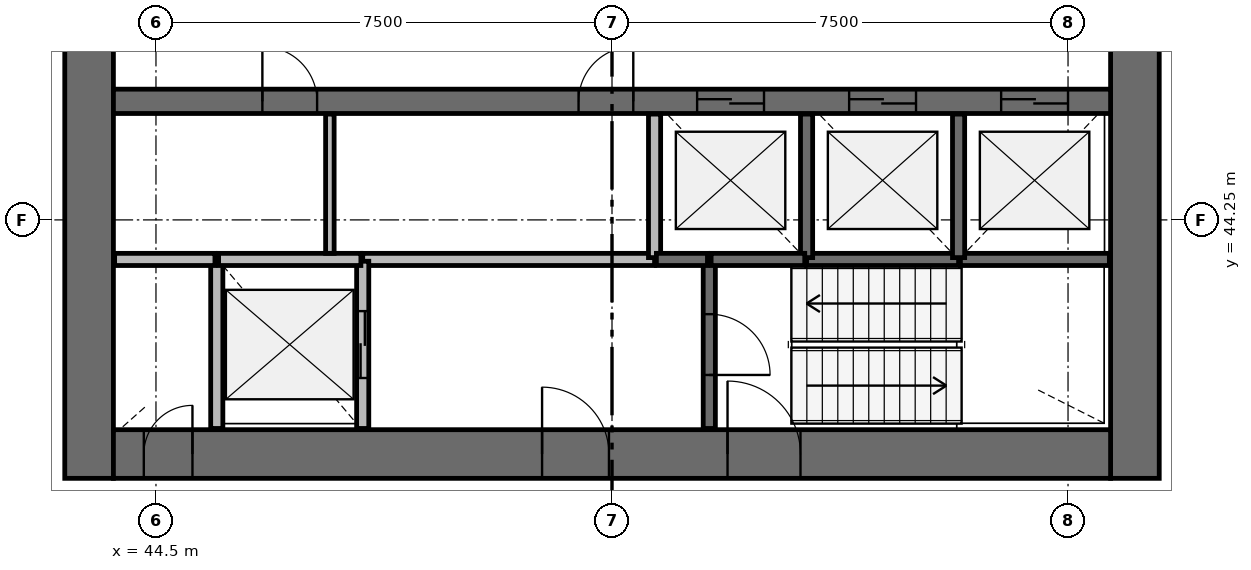
"""IFC4 building model, lengths in metres.
Left out: names, types, materials, properties, quantities, classifications, styles, units other than length and angle.
Written with IfcOpenShell. Run it as: python <this file> out.ifc"""

import sys

from ifc_helpers import new_model, si_unit, direction, frame, frame_2d, origin, place, context, subcontext, project, spatial, rectangle, extrude, source, transform, mapped, element, fill, save


model = new_model("IFC4")
c1 = context("Model", 3, precision=1e-05, world=origin(), true_north=direction((0.0, 1.0)))
c2 = subcontext(c1, "Body", "Model", "MODEL_VIEW")
j1 = project(units=[si_unit("LENGTHUNIT", "METRE"), si_unit("PLANEANGLEUNIT", "RADIAN")], contexts=[c1])
p1 = place(None, origin())
s1 = spatial("IfcSite", under=j1, at=p1, CompositionType="ELEMENT")
p2 = place(p1, origin())
s2 = spatial("IfcBuilding", under=s1, at=p2, CompositionType="ELEMENT")
p3 = place(p2, frame((0.0, 0.0, 160.4)))
s3 = spatial("IfcBuildingStorey", under=s2, at=p3, CompositionType="ELEMENT", Elevation=160.4)
p4 = place(p3, frame((60.6, 40.0, 0.0), z_axis=(0.0, 0.0, 1.0), x_axis=(0.0, 1.0, 0.0)))
e1 = element("IfcWall", 1, at=p4, inside=s3, PredefinedType="SHEAR", context=c2, shape_type="SweptSolid", body=[
    extrude(rectangle(XDim=16.0, YDim=0.8, at=frame_2d((8.0, 0.0))), origin(), (0.0, 0.0, 1.0), 3.9),
])
p5 = place(p4, frame((7.1, 0.0, 0.0)))
e2 = element("IfcOpeningElement", 2, at=p5, cuts=e1, PredefinedType="OPENING", context=c2, shape_type="SweptSolid", body=[
    extrude(rectangle(XDim=1.8, YDim=2.1, at=frame_2d((0.9, 1.05))), frame((0.0, 0.41, 0.0), z_axis=(0.0, -1.0, 0.0), x_axis=(1.0, 0.0, 0.0)), (0.0, 0.0, 1.0), 0.82),
])
p6 = place(p3, frame((43.4, 56.0, 0.0), z_axis=(0.0, 0.0, 1.0), x_axis=(0.0, -1.0, 0.0)))
e3 = element("IfcWall", 3, at=p6, inside=s3, PredefinedType="SHEAR", context=c2, shape_type="SweptSolid", body=[
    extrude(rectangle(XDim=16.0, YDim=0.8, at=frame_2d((8.0, 0.0))), origin(), (0.0, 0.0, 1.0), 3.9),
])
p7 = place(p6, frame((7.1, 0.0, 0.0)))
e4 = element("IfcOpeningElement", 4, at=p7, cuts=e3, PredefinedType="OPENING", context=c2, shape_type="SweptSolid", body=[
    extrude(rectangle(XDim=1.8, YDim=2.1, at=frame_2d((0.9, 1.05))), frame((0.0, 0.41, 0.0), z_axis=(0.0, -1.0, 0.0), x_axis=(1.0, 0.0, 0.0)), (0.0, 0.0, 1.0), 0.82),
])
p8 = place(p3, frame((43.8, 40.4, 0.0), z_axis=(0.0, 0.0, 1.0), x_axis=(1.0, 0.0, 0.0)))
e5 = element("IfcWall", 5, at=p8, inside=s3, PredefinedType="SHEAR", context=c2, shape_type="SweptSolid", body=[
    extrude(rectangle(XDim=16.4, YDim=0.8, at=frame_2d((8.2, 0.0))), origin(), (0.0, 0.0, 1.0), 3.9),
])
p9 = place(p8, frame((10.1, 0.0, 0.0)))
e6 = element("IfcOpeningElement", 6, at=p9, cuts=e5, PredefinedType="OPENING", context=c2, shape_type="SweptSolid", body=[
    extrude(rectangle(XDim=1.2, YDim=2.1, at=frame_2d((0.6, 1.05))), frame((0.0, 0.41, 0.0), z_axis=(0.0, -1.0, 0.0), x_axis=(1.0, 0.0, 0.0)), (0.0, 0.0, 1.0), 0.82),
])
p10 = place(p8, frame((7.05, 0.0, 0.0)))
e7 = element("IfcOpeningElement", 7, at=p10, cuts=e5, PredefinedType="OPENING", context=c2, shape_type="SweptSolid", body=[
    extrude(rectangle(XDim=1.1, YDim=2.1, at=frame_2d((0.55, 1.05))), frame((0.0, 0.41, 0.0), z_axis=(0.0, -1.0, 0.0), x_axis=(1.0, 0.0, 0.0)), (0.0, 0.0, 1.0), 0.82),
])
p11 = place(p8, frame((0.5, 0.0, 0.0)))
e8 = element("IfcOpeningElement", 8, at=p11, cuts=e5, PredefinedType="OPENING", context=c2, shape_type="SweptSolid", body=[
    extrude(rectangle(XDim=0.8, YDim=2.1, at=frame_2d((0.4, 1.05))), frame((0.0, 0.41, 0.0), z_axis=(0.0, -1.0, 0.0), x_axis=(1.0, 0.0, 0.0)), (0.0, 0.0, 1.0), 0.82),
])
p12 = place(p3, frame((43.8, 46.2, 0.0), z_axis=(0.0, 0.0, 1.0), x_axis=(1.0, 0.0, 0.0)))
e9 = element("IfcWall", 9, at=p12, inside=s3, PredefinedType="SHEAR", context=c2, shape_type="SweptSolid", body=[
    extrude(rectangle(XDim=16.4, YDim=0.4, at=frame_2d((8.2, 0.0))), origin(), (0.0, 0.0, 1.0), 3.9),
])
p13 = place(p12, frame((9.6, 0.0, 0.0)))
e10 = element("IfcOpeningElement", 10, at=p13, cuts=e9, PredefinedType="OPENING", context=c2, shape_type="SweptSolid", body=[
    extrude(rectangle(XDim=1.1, YDim=2.1, at=frame_2d((0.55, 1.05))), frame((0.0, 0.21, 0.0), z_axis=(0.0, -1.0, 0.0), x_axis=(1.0, 0.0, 0.0)), (0.0, 0.0, 1.0), 0.42),
])
p14 = place(p12, frame((12.1, 0.0, 0.0)))
e11 = element("IfcOpeningElement", 11, at=p14, cuts=e9, PredefinedType="OPENING", context=c2, shape_type="SweptSolid", body=[
    extrude(rectangle(XDim=1.1, YDim=2.1, at=frame_2d((0.55, 1.05))), frame((0.0, 0.21, 0.0), z_axis=(0.0, -1.0, 0.0), x_axis=(1.0, 0.0, 0.0)), (0.0, 0.0, 1.0), 0.42),
])
p15 = place(p12, frame((14.6, 0.0, 0.0)))
e12 = element("IfcOpeningElement", 12, at=p15, cuts=e9, PredefinedType="OPENING", context=c2, shape_type="SweptSolid", body=[
    extrude(rectangle(XDim=1.1, YDim=2.1, at=frame_2d((0.55, 1.05))), frame((0.0, 0.21, 0.0), z_axis=(0.0, -1.0, 0.0), x_axis=(1.0, 0.0, 0.0)), (0.0, 0.0, 1.0), 0.42),
])
p16 = place(p12, frame((2.45, 0.0, 0.0)))
e13 = element("IfcOpeningElement", 13, at=p16, cuts=e9, PredefinedType="OPENING", context=c2, shape_type="SweptSolid", body=[
    extrude(rectangle(XDim=0.9, YDim=2.1, at=frame_2d((0.45, 1.05))), frame((0.0, 0.21, 0.0), z_axis=(0.0, -1.0, 0.0), x_axis=(1.0, 0.0, 0.0)), (0.0, 0.0, 1.0), 0.42),
])
p17 = place(p12, frame((7.65, 0.0, 0.0)))
e14 = element("IfcOpeningElement", 14, at=p17, cuts=e9, PredefinedType="OPENING", context=c2, shape_type="SweptSolid", body=[
    extrude(rectangle(XDim=0.9, YDim=2.1, at=frame_2d((0.45, 1.05))), frame((0.0, 0.21, 0.0), z_axis=(0.0, -1.0, 0.0), x_axis=(1.0, 0.0, 0.0)), (0.0, 0.0, 1.0), 0.42),
])
p18 = place(p3, frame((52.7, 43.6, 0.0), z_axis=(0.0, 0.0, 1.0), x_axis=(-1.0, 0.0, 0.0)))
e15 = element("IfcWall", 15, at=p18, inside=s3, PredefinedType="SOLIDWALL", context=c2, shape_type="SweptSolid", body=[
    extrude(rectangle(XDim=4.8, YDim=0.2, at=frame_2d((2.4, 0.0))), origin(), (0.0, 0.0, 1.0), 3.58),
])
p19 = place(p3, frame((45.5, 43.6, 0.0), z_axis=(0.0, 0.0, 1.0), x_axis=(0.0, -1.0, 0.0)))
e16 = element("IfcWall", 16, at=p19, inside=s3, PredefinedType="SOLIDWALL", context=c2, shape_type="SweptSolid", body=[
    extrude(rectangle(XDim=2.78, YDim=0.2, at=frame_2d((1.39, 0.0))), origin(), (0.0, 0.0, 1.0), 3.58),
])
p20 = place(p3, frame((47.9, 40.82, 0.0), z_axis=(0.0, 0.0, 1.0), x_axis=(0.0, 1.0, 0.0)))
e17 = element("IfcWall", 17, at=p20, inside=s3, PredefinedType="SOLIDWALL", context=c2, shape_type="SweptSolid", body=[
    extrude(rectangle(XDim=2.75, YDim=0.2, at=frame_2d((1.375, 0.0))), origin(), (0.0, 0.0, 1.0), 3.58),
])
p21 = place(p20, frame((0.83, 0.0, 0.0)))
e18 = element("IfcOpeningElement", 18, at=p21, cuts=e17, PredefinedType="OPENING", context=c2, shape_type="SweptSolid", body=[
    extrude(rectangle(XDim=1.1, YDim=2.1, at=frame_2d((0.55, 1.05))), frame((0.0, 0.11, 0.0), z_axis=(0.0, -1.0, 0.0), x_axis=(1.0, 0.0, 0.0)), (0.0, 0.0, 1.0), 0.22),
])
p22 = place(p3, frame((53.6, 43.6, 0.0), z_axis=(0.0, 0.0, 1.0), x_axis=(0.0, -1.0, 0.0)))
e19 = element("IfcWall", 19, at=p22, inside=s3, PredefinedType="SOLIDWALL", context=c2, shape_type="SweptSolid", body=[
    extrude(rectangle(XDim=2.78, YDim=0.2, at=frame_2d((1.39, 0.0))), origin(), (0.0, 0.0, 1.0), 3.58),
])
p23 = place(p22, frame((0.9, 0.0, 0.0)))
e20 = element("IfcOpeningElement", 20, at=p23, cuts=e19, PredefinedType="OPENING", context=c2, shape_type="SweptSolid", body=[
    extrude(rectangle(XDim=1.0, YDim=2.1, at=frame_2d((0.5, 1.05))), frame((0.0, 0.11, 0.0), z_axis=(0.0, -1.0, 0.0), x_axis=(1.0, 0.0, 0.0)), (0.0, 0.0, 1.0), 0.22),
])
p24 = place(p3, frame((55.2, 43.6, 0.0), z_axis=(0.0, 0.0, 1.0), x_axis=(1.0, 0.0, 0.0)))
e21 = element("IfcWall", 21, at=p24, inside=s3, PredefinedType="SOLIDWALL", context=c2, shape_type="SweptSolid", body=[
    extrude(rectangle(XDim=2.5, YDim=0.2, at=frame_2d((1.25, 0.0))), origin(), (0.0, 0.0, 1.0), 3.58),
])
p25 = place(p3, frame((57.73, 43.6, 0.0), z_axis=(0.0, 0.0, 1.0), x_axis=(1.0, 0.0, 0.0)))
e22 = element("IfcWall", 22, at=p25, inside=s3, PredefinedType="SOLIDWALL", context=c2, shape_type="SweptSolid", body=[
    extrude(rectangle(XDim=2.45, YDim=0.2, at=frame_2d((1.225, 0.0))), origin(), (0.0, 0.0, 1.0), 3.58),
])
p26 = place(p3, frame((47.87, 43.6, 0.0), z_axis=(0.0, 0.0, 1.0), x_axis=(-1.0, 0.0, 0.0)))
e23 = element("IfcWall", 23, at=p26, inside=s3, PredefinedType="SOLIDWALL", context=c2, shape_type="SweptSolid", body=[
    extrude(rectangle(XDim=2.34, YDim=0.2, at=frame_2d((1.17, 0.0))), origin(), (0.0, 0.0, 1.0), 3.58),
])
for number, where, z_axis, x_axis in (
    (24, (52.7, 45.99, 0.0), (0.0, 0.0, 1.0), (0.0, -1.0, 0.0)),
    (25, (55.2, 43.63, 0.0), (0.0, 0.0, 1.0), (0.0, 1.0, 0.0)),
    (26, (57.7, 43.63, 0.0), (0.0, 0.0, 1.0), (0.0, 1.0, 0.0)),
):
    element("IfcWall", number, at=place(p3, frame(where, z_axis=z_axis, x_axis=x_axis)), inside=s3, PredefinedType="SOLIDWALL", context=c2, shape_type="SweptSolid", body=[
        extrude(rectangle(XDim=2.36, YDim=0.2, at=frame_2d((1.18, 0.0))), origin(), (0.0, 0.0, 1.0), 3.58),
    ])
p27 = place(p3, frame((45.47, 43.6, 0.0), z_axis=(0.0, 0.0, 1.0), x_axis=(-1.0, 0.0, 0.0)))
e27 = element("IfcWall", 27, at=p27, inside=s3, PredefinedType="SOLIDWALL", context=c2, shape_type="SweptSolid", body=[
    extrude(rectangle(XDim=1.65, YDim=0.2, at=frame_2d((0.825, 0.0))), origin(), (0.0, 0.0, 1.0), 3.58),
])
p28 = place(p3, frame((53.63, 43.6, 0.0), z_axis=(0.0, 0.0, 1.0), x_axis=(1.0, 0.0, 0.0)))
e28 = element("IfcWall", 28, at=p28, inside=s3, PredefinedType="SOLIDWALL", context=c2, shape_type="SweptSolid", body=[
    extrude(rectangle(XDim=1.54, YDim=0.2, at=frame_2d((0.77, 0.0))), origin(), (0.0, 0.0, 1.0), 3.58),
])
p29 = place(p3, frame((52.73, 43.6, 0.0), z_axis=(0.0, 0.0, 1.0), x_axis=(1.0, 0.0, 0.0)))
e29 = element("IfcWall", 29, at=p29, inside=s3, PredefinedType="SOLIDWALL", context=c2, shape_type="SweptSolid", body=[
    extrude(rectangle(XDim=0.84, YDim=0.2, at=frame_2d((0.42, 0.0))), origin(), (0.0, 0.0, 1.0), 3.58),
])
p30 = place(p3, frame((47.36, 43.7, 0.0), z_axis=(0.0, 0.0, 1.0), x_axis=(0.0, 1.0, 0.0)))
e30 = element("IfcWall", 30, at=p30, inside=s3, PredefinedType="PARTITIONING", context=c2, shape_type="SweptSolid", body=[
    extrude(rectangle(XDim=2.29, YDim=0.14, at=frame_2d((1.145, 0.0))), origin(), (0.0, 0.0, 1.0), 2.88),
])
m1 = source(origin(), c2, "Body", "SweptSolid", [
    extrude(rectangle(XDim=1.1, YDim=2.1, at=frame_2d((0.55, 1.05))), frame((0.0, 0.025, 0.0), z_axis=(0.0, -1.0, 0.0), x_axis=(1.0, 0.0, 0.0)), (0.0, 0.0, 1.0), 0.05),
])
p31 = place(p13, origin())
e31 = element("IfcDoor", 31, at=p31, inside=s3, OperationType="DOUBLE_DOOR_SLIDING", PredefinedType="USERDEFINED", context=c2, shape_type="MappedRepresentation", body=[
    mapped(m1, transform((0.0, 0.0, 0.0), scale=1.0)),
])
fill(e10, e31)
p32 = place(p14, origin())
e32 = element("IfcDoor", 32, at=p32, inside=s3, OperationType="DOUBLE_DOOR_SLIDING", PredefinedType="USERDEFINED", context=c2, shape_type="MappedRepresentation", body=[
    mapped(m1, transform((0.0, 0.0, 0.0), scale=1.0)),
])
fill(e11, e32)
p33 = place(p15, origin())
e33 = element("IfcDoor", 33, at=p33, inside=s3, OperationType="DOUBLE_DOOR_SLIDING", PredefinedType="USERDEFINED", context=c2, shape_type="MappedRepresentation", body=[
    mapped(m1, transform((0.0, 0.0, 0.0), scale=1.0)),
])
fill(e12, e33)
p34 = place(p21, origin())
e34 = element("IfcDoor", 34, at=p34, inside=s3, OperationType="DOUBLE_DOOR_SLIDING", PredefinedType="USERDEFINED", context=c2, shape_type="MappedRepresentation", body=[
    mapped(m1, transform((0.0, 0.0, 0.0), scale=1.0)),
])
fill(e18, e34)
m2 = source(origin(), c2, "Body", "SweptSolid", [
    extrude(rectangle(XDim=1.2, YDim=2.1, at=frame_2d((0.6, 1.05))), frame((0.0, 0.025, 0.0), z_axis=(0.0, -1.0, 0.0), x_axis=(1.0, 0.0, 0.0)), (0.0, 0.0, 1.0), 0.05),
])
p35 = place(p9, origin())
e35 = element("IfcDoor", 35, at=p35, inside=s3, OperationType="SINGLE_SWING_LEFT", PredefinedType="DOOR", context=c2, shape_type="MappedRepresentation", body=[
    mapped(m2, transform((0.0, 0.0, 0.0), scale=1.0)),
])
fill(e6, e35)
m3 = source(origin(), c2, "Body", "SweptSolid", [
    extrude(rectangle(XDim=1.0, YDim=2.1, at=frame_2d((0.5, 1.05))), frame((0.0, 0.025, 0.0), z_axis=(0.0, -1.0, 0.0), x_axis=(1.0, 0.0, 0.0)), (0.0, 0.0, 1.0), 0.05),
])
p36 = place(p23, origin())
e36 = element("IfcDoor", 36, at=p36, inside=s3, OperationType="SINGLE_SWING_RIGHT", PredefinedType="DOOR", context=c2, shape_type="MappedRepresentation", body=[
    mapped(m3, transform((0.0, 0.0, 0.0), scale=1.0)),
])
fill(e20, e36)
m4 = source(origin(), c2, "Body", "SweptSolid", [
    extrude(rectangle(XDim=1.1, YDim=2.1, at=frame_2d((0.55, 1.05))), frame((0.0, 0.025, 0.0), z_axis=(0.0, -1.0, 0.0), x_axis=(1.0, 0.0, 0.0)), (0.0, 0.0, 1.0), 0.05),
])
p37 = place(p10, origin())
e37 = element("IfcDoor", 37, at=p37, inside=s3, OperationType="SINGLE_SWING_LEFT", PredefinedType="DOOR", context=c2, shape_type="MappedRepresentation", body=[
    mapped(m4, transform((0.0, 0.0, 0.0), scale=1.0)),
])
fill(e7, e37)
m5 = source(origin(), c2, "Body", "SweptSolid", [
    extrude(rectangle(XDim=0.8, YDim=2.1, at=frame_2d((0.4, 1.05))), frame((0.0, 0.025, 0.0), z_axis=(0.0, -1.0, 0.0), x_axis=(1.0, 0.0, 0.0)), (0.0, 0.0, 1.0), 0.05),
])
p38 = place(p11, origin())
e38 = element("IfcDoor", 38, at=p38, inside=s3, OperationType="SINGLE_SWING_RIGHT", PredefinedType="DOOR", context=c2, shape_type="MappedRepresentation", body=[
    mapped(m5, transform((0.0, 0.0, 0.0), scale=1.0)),
])
fill(e8, e38)
m6 = source(origin(), c2, "Body", "SweptSolid", [
    extrude(rectangle(XDim=0.9, YDim=2.1, at=frame_2d((0.45, 1.05))), frame((0.0, 0.025, 0.0), z_axis=(0.0, -1.0, 0.0), x_axis=(1.0, 0.0, 0.0)), (0.0, 0.0, 1.0), 0.05),
])
p39 = place(p16, origin())
e39 = element("IfcDoor", 39, at=p39, inside=s3, OperationType="SINGLE_SWING_LEFT", PredefinedType="DOOR", context=c2, shape_type="MappedRepresentation", body=[
    mapped(m6, transform((0.0, 0.0, 0.0), scale=1.0)),
])
fill(e13, e39)
p40 = place(p17, origin())
e40 = element("IfcDoor", 40, at=p40, inside=s3, OperationType="SINGLE_SWING_RIGHT", PredefinedType="DOOR", context=c2, shape_type="MappedRepresentation", body=[
    mapped(m6, transform((0.0, 0.0, 0.0), scale=1.0)),
])
fill(e14, e40)
save(model, sys.argv[1])
